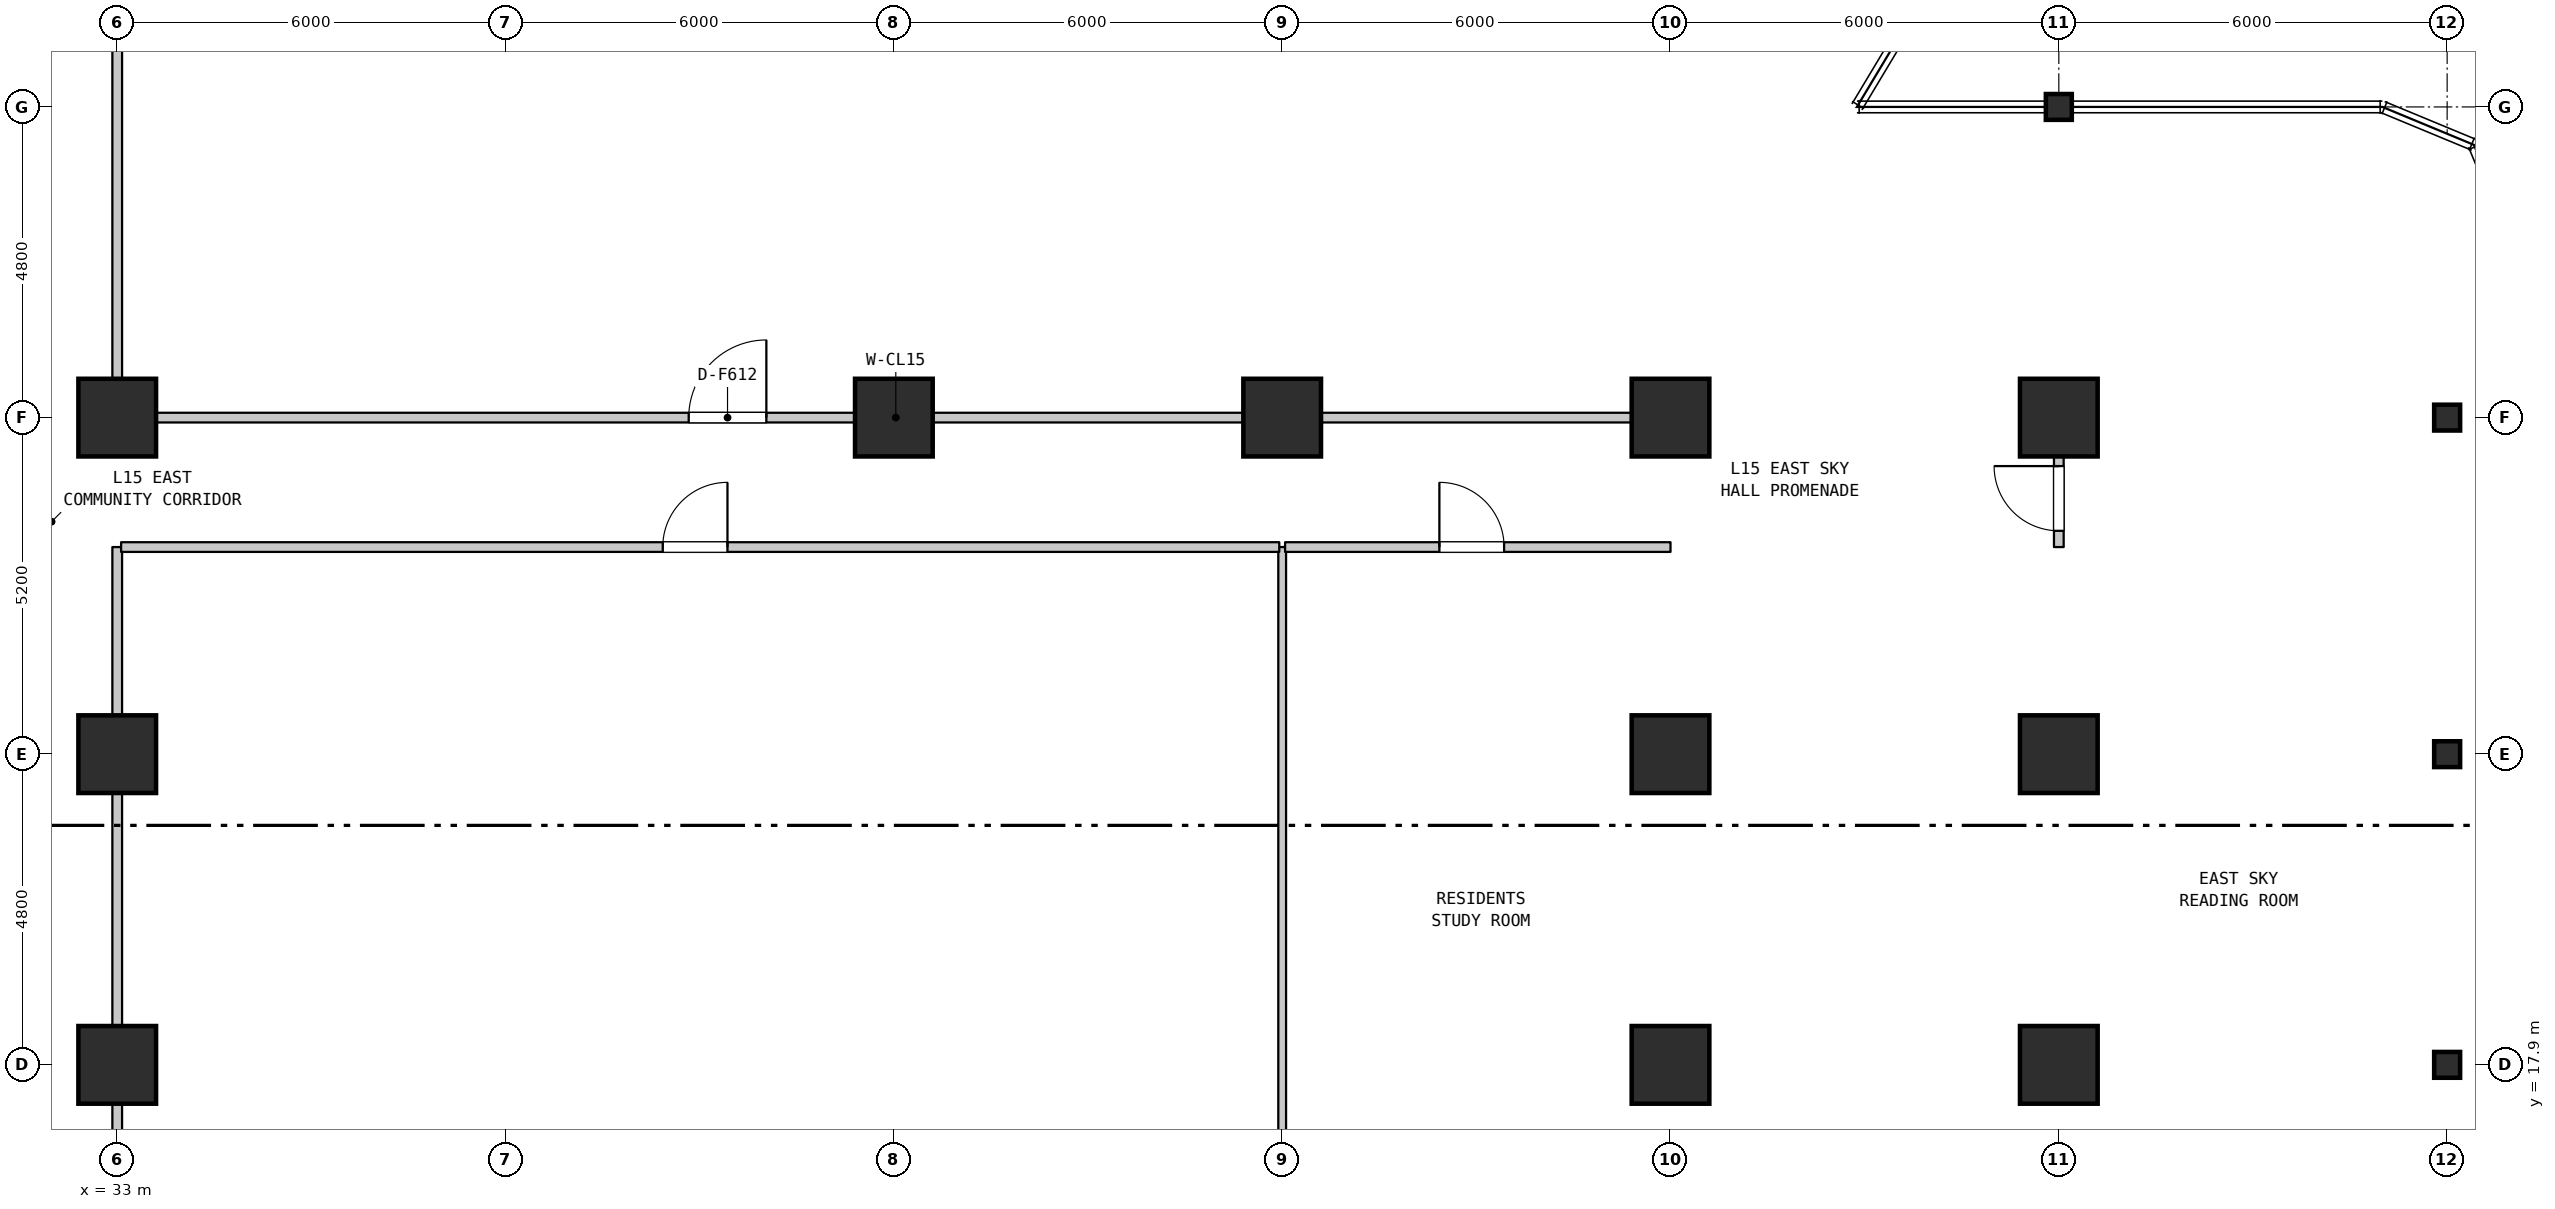
"""IFC4 building model, lengths in metres.
Left out: names, types, materials, properties, quantities, classifications, styles, units other than length and angle.
Written with IfcOpenShell. Run it as: python <this file> out.ifc"""

import sys

from ifc_helpers import new_model, si_unit, direction, frame, frame_2d, origin, origin_2d, place, context, subcontext, project, spatial, rectangle, i_section, extrude, element, fill, save


model = new_model("IFC4")
c1 = context("Model", 3, precision=1e-05, world=origin(), true_north=direction((0.0, 1.0)))
c2 = subcontext(c1, "Body", "Model", "MODEL_VIEW")
j1 = project(units=[si_unit("LENGTHUNIT", "METRE"), si_unit("PLANEANGLEUNIT", "RADIAN")], contexts=[c1])
p1 = place(None, origin())
s1 = spatial("IfcSite", under=j1, at=p1, CompositionType="ELEMENT")
p2 = place(p1, origin())
s2 = spatial("IfcBuilding", under=s1, at=p2, CompositionType="ELEMENT")
p3 = place(p2, frame((0.0, 0.0, 65.6)))
s3 = spatial("IfcBuildingStorey", under=s2, at=p3, CompositionType="ELEMENT", Elevation=65.6)
for number, where, z_axis, x_axis in (
    (1, (33.0, 17.9, 0.0), (0.0, 0.0, 1.0), (1.0, 0.0, 0.0)),
    (2, (33.0, 22.7, 0.0), (0.0, 0.0, 1.0), (1.0, 0.0, 0.0)),
    (3, (33.0, 27.9, 0.0), (0.0, 0.0, 1.0), (1.0, 0.0, 0.0)),
    (4, (45.0, 27.9, 0.0), (0.0, 0.0, 1.0), (1.0, 0.0, 0.0)),
    (5, (51.0, 27.9, 0.0), (0.0, 0.0, 1.0), (1.0, 0.0, 0.0)),
    (6, (57.0, 17.9, 0.0), (0.0, 0.0, 1.0), (1.0, 0.0, 0.0)),
    (7, (57.0, 22.7, 0.0), (0.0, 0.0, 1.0), (1.0, 0.0, 0.0)),
    (8, (57.0, 27.9, 0.0), (0.0, 0.0, 1.0), (1.0, 0.0, 0.0)),
    (9, (63.0, 17.9, 0.0), (0.0, 0.0, 1.0), (1.0, 0.0, 0.0)),
    (10, (63.0, 22.7, 0.0), (0.0, 0.0, 1.0), (1.0, 0.0, 0.0)),
    (11, (63.0, 27.9, 0.0), (0.0, 0.0, 1.0), (1.0, 0.0, 0.0)),
):
    element("IfcColumn", number, at=place(p3, frame(where, z_axis=z_axis, x_axis=x_axis)), inside=s3, PredefinedType="COLUMN", context=c2, shape_type="SweptSolid", body=[
        extrude(rectangle(XDim=1.2, YDim=1.2, at=origin_2d()), origin(), (0.0, 0.0, 1.0), 4.5),
    ])
for number, where, z_axis, x_axis in (
    (12, (63.0, 32.7, 0.0), (0.0, 0.0, 1.0), (1.0, 0.0, 0.0)),
    (13, (69.0, 17.9, 0.0), (0.0, 0.0, 1.0), (1.0, 0.0, 0.0)),
    (14, (69.0, 22.7, 0.0), (0.0, 0.0, 1.0), (1.0, 0.0, 0.0)),
    (15, (69.0, 27.9, 0.0), (0.0, 0.0, 1.0), (1.0, 0.0, 0.0)),
):
    element("IfcColumn", number, at=place(p3, frame(where, z_axis=z_axis, x_axis=x_axis)), inside=s3, PredefinedType="COLUMN", context=c2, shape_type="SweptSolid", body=[
        extrude(i_section(OverallWidth=0.401, OverallDepth=0.399, WebThickness=0.025, FlangeThickness=0.04, FilletRadius=0.015, at=origin_2d()), origin(), (0.0, 0.0, 1.0), 4.5),
    ])
p4 = place(p3, frame((33.0, 6.7, 0.0), z_axis=(0.0, 0.0, 1.0), x_axis=(0.0, 1.0, 0.0)))
e16 = element("IfcWall", 16, at=p4, inside=s3, PredefinedType="STANDARD", context=c2, shape_type="SweptSolid", body=[
    extrude(rectangle(XDim=19.2, YDim=0.15, at=frame_2d((9.6, 0.0))), origin(), (0.0, 0.0, 1.0), 3.685),
])
p5 = place(p3, frame((33.0, 27.9, 0.0), z_axis=(0.0, 0.0, 1.0), x_axis=(0.0, 1.0, 0.0)))
e17 = element("IfcWall", 17, at=p5, inside=s3, PredefinedType="STANDARD", context=c2, shape_type="SweptSolid", body=[
    extrude(rectangle(XDim=10.0, YDim=0.15, at=frame_2d((5.0, 0.0))), origin(), (0.0, 0.0, 1.0), 3.685),
])
p6 = place(p3, frame((51.0, 6.7, 0.0), z_axis=(0.0, 0.0, 1.0), x_axis=(0.0, 1.0, 0.0)))
e18 = element("IfcWall", 18, at=p6, inside=s3, PredefinedType="PARTITIONING", context=c2, shape_type="SweptSolid", body=[
    extrude(rectangle(XDim=19.2, YDim=0.12, at=frame_2d((9.6, 0.0))), origin(), (0.0, 0.0, 1.0), 4.185),
])
p7 = place(p3, frame((63.0, 25.9, 0.0), z_axis=(0.0, 0.0, 1.0), x_axis=(0.0, 1.0, 0.0)))
e19 = element("IfcWall", 19, at=p7, inside=s3, PredefinedType="STANDARD", context=c2, shape_type="SweptSolid", body=[
    extrude(rectangle(XDim=2.0, YDim=0.15, at=frame_2d((1.0, 0.0))), origin(), (0.0, 0.0, 1.0), 3.685),
])
p8 = place(p7, frame((0.251, 0.0, 0.0)))
e20 = element("IfcOpeningElement", 20, at=p8, cuts=e19, PredefinedType="OPENING", context=c2, shape_type="SweptSolid", body=[
    extrude(rectangle(XDim=1.0, YDim=2.15, at=frame_2d((0.5, 1.075))), frame((0.0, 0.085, 0.0), z_axis=(0.0, -1.0, 0.0), x_axis=(1.0, 0.0, 0.0)), (0.0, 0.0, 1.0), 0.17),
])
p9 = place(p3, frame((33.06, 25.9, 0.0), z_axis=(0.0, 0.0, 1.0), x_axis=(1.0, 0.0, 0.0)))
e21 = element("IfcWall", 21, at=p9, inside=s3, PredefinedType="STANDARD", context=c2, shape_type="SweptSolid", body=[
    extrude(rectangle(XDim=17.895, YDim=0.15, at=frame_2d((8.948, 0.0))), origin(), (0.0, 0.0, 1.0), 4.185),
])
p10 = place(p9, frame((8.369, 0.0, 0.0)))
e22 = element("IfcOpeningElement", 22, at=p10, cuts=e21, PredefinedType="OPENING", context=c2, shape_type="SweptSolid", body=[
    extrude(rectangle(XDim=1.0, YDim=2.15, at=frame_2d((0.5, 1.075))), frame((0.0, 0.085, 0.0), z_axis=(0.0, -1.0, 0.0), x_axis=(1.0, 0.0, 0.0)), (0.0, 0.0, 1.0), 0.17),
])
p11 = place(p3, frame((51.045, 25.9, 0.0), z_axis=(0.0, 0.0, 1.0), x_axis=(1.0, 0.0, 0.0)))
e23 = element("IfcWall", 23, at=p11, inside=s3, PredefinedType="STANDARD", context=c2, shape_type="SweptSolid", body=[
    extrude(rectangle(XDim=5.955, YDim=0.15, at=frame_2d((2.978, 0.0))), origin(), (0.0, 0.0, 1.0), 4.185),
])
p12 = place(p11, frame((2.384, 0.0, 0.0)))
e24 = element("IfcOpeningElement", 24, at=p12, cuts=e23, PredefinedType="OPENING", context=c2, shape_type="SweptSolid", body=[
    extrude(rectangle(XDim=1.0, YDim=2.15, at=frame_2d((0.5, 1.075))), frame((0.0, 0.085, 0.0), z_axis=(0.0, -1.0, 0.0), x_axis=(1.0, 0.0, 0.0)), (0.0, 0.0, 1.0), 0.17),
])
p13 = place(p3, frame((33.06, 27.9, 0.0), z_axis=(0.0, 0.0, 1.0), x_axis=(1.0, 0.0, 0.0)))
e25 = element("IfcWall", 25, at=p13, inside=s3, PredefinedType="STANDARD", context=c2, shape_type="SweptSolid", body=[
    extrude(rectangle(XDim=23.94, YDim=0.15, at=frame_2d((11.97, 0.0))), origin(), (0.0, 0.0, 1.0), 3.685),
])
p14 = place(p13, frame((8.77, 0.0, 0.0)))
e26 = element("IfcOpeningElement", 26, at=p14, cuts=e25, PredefinedType="OPENING", context=c2, shape_type="SweptSolid", body=[
    extrude(rectangle(XDim=1.2, YDim=2.2, at=frame_2d((0.6, 1.1))), frame((0.0, 0.085, 0.0), z_axis=(0.0, -1.0, 0.0), x_axis=(1.0, 0.0, 0.0)), (0.0, 0.0, 1.0), 0.17),
])
p15 = place(p8, origin())
e27 = element("IfcDoor", 27, at=p15, inside=s3, OperationType="SINGLE_SWING_RIGHT", PredefinedType="DOOR", context=c2, shape_type="SweptSolid", body=[
    extrude(rectangle(XDim=1.0, YDim=2.15, at=frame_2d((0.5, 1.075))), frame((0.0, 0.025, 0.0), z_axis=(0.0, -1.0, 0.0), x_axis=(1.0, 0.0, 0.0)), (0.0, 0.0, 1.0), 0.05),
])
fill(e20, e27)
p16 = place(p10, origin())
e28 = element("IfcDoor", 28, at=p16, inside=s3, OperationType="SINGLE_SWING_RIGHT", PredefinedType="DOOR", context=c2, shape_type="SweptSolid", body=[
    extrude(rectangle(XDim=1.0, YDim=2.15, at=frame_2d((0.5, 1.075))), frame((0.0, 0.025, 0.0), z_axis=(0.0, -1.0, 0.0), x_axis=(1.0, 0.0, 0.0)), (0.0, 0.0, 1.0), 0.05),
])
fill(e22, e28)
p17 = place(p12, origin())
e29 = element("IfcDoor", 29, at=p17, inside=s3, OperationType="SINGLE_SWING_LEFT", PredefinedType="DOOR", context=c2, shape_type="SweptSolid", body=[
    extrude(rectangle(XDim=1.0, YDim=2.15, at=frame_2d((0.5, 1.075))), frame((0.0, 0.025, 0.0), z_axis=(0.0, -1.0, 0.0), x_axis=(1.0, 0.0, 0.0)), (0.0, 0.0, 1.0), 0.05),
])
fill(e24, e29)
p18 = place(p14, origin())
e30 = element("IfcDoor", 30, at=p18, inside=s3, OperationType="SINGLE_SWING_RIGHT", PredefinedType="DOOR", context=c2, shape_type="SweptSolid", body=[
    extrude(rectangle(XDim=1.2, YDim=2.2, at=frame_2d((0.6, 1.1))), frame((0.0, 0.025, 0.0), z_axis=(0.0, -1.0, 0.0), x_axis=(1.0, 0.0, 0.0)), (0.0, 0.0, 1.0), 0.05),
])
fill(e26, e30)
save(model, sys.argv[1])
